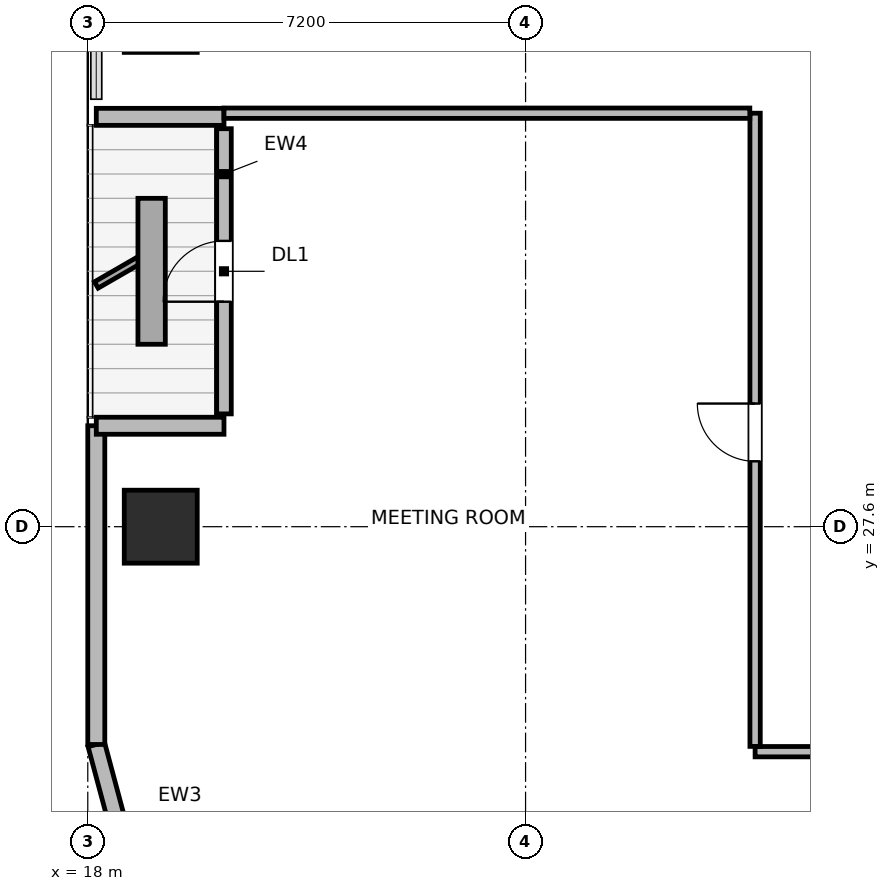
"""IFC4 building model, lengths in metres.
Left out: names, types, materials, properties, quantities, classifications, styles, units other than length and angle.
Written with IfcOpenShell. Run it as: python <this file> out.ifc"""

import sys

from ifc_helpers import new_model, si_unit, direction, frame, frame_2d, origin, origin_2d, place, context, subcontext, project, spatial, rectangle, extrude, element, fill, save


model = new_model("IFC4")
c1 = context("Model", 3, precision=1e-05, world=origin(), true_north=direction((0.0, 1.0)))
c2 = subcontext(c1, "Body", "Model", "MODEL_VIEW")
j1 = project(units=[si_unit("LENGTHUNIT", "METRE"), si_unit("PLANEANGLEUNIT", "RADIAN")], contexts=[c1])
p1 = place(None, origin())
s1 = spatial("IfcSite", under=j1, at=p1, CompositionType="ELEMENT")
p2 = place(p1, origin())
s2 = spatial("IfcBuilding", under=s1, at=p2, CompositionType="ELEMENT")
p3 = place(p2, frame((0.0, 0.0, 205.8)))
s3 = spatial("IfcBuildingStorey", under=s2, at=p3, CompositionType="ELEMENT", Elevation=205.8)
p4 = place(p3, frame((19.2, 27.6, 0.0), z_axis=(0.0, 0.0, 1.0), x_axis=(1.0, 0.0, 0.0)))
e1 = element("IfcColumn", 1, at=p4, inside=s3, PredefinedType="COLUMN", context=c2, shape_type="SweptSolid", body=[
    extrude(rectangle(XDim=1.2, YDim=1.2, at=origin_2d()), origin(), (0.0, 0.0, 1.0), 3.9),
])
p5 = place(p3, frame((18.848, 21.373, 0.0), z_axis=(0.0, 0.0, 1.0), x_axis=(-0.258672222976, 0.9659651552, 0.0)))
e2 = element("IfcWall", 2, at=p5, inside=s3, PredefinedType="SOLIDWALL", context=c2, shape_type="SweptSolid", body=[
    extrude(rectangle(XDim=2.739, YDim=0.28, at=frame_2d((1.37, 0.0))), origin(), (0.0, 0.0, 1.0), 3.6),
])
p6 = place(p3, frame((18.14, 24.018, 0.0), z_axis=(0.0, 0.0, 1.0), x_axis=(0.0, 1.0, 0.0)))
e3 = element("IfcWall", 3, at=p6, inside=s3, PredefinedType="SOLIDWALL", context=c2, shape_type="SweptSolid", body=[
    extrude(rectangle(XDim=5.242, YDim=0.28, at=frame_2d((2.621, 0.0))), origin(), (0.0, 0.0, 1.0), 3.6),
])
p7 = place(p3, frame((18.14, 29.26, 0.0), z_axis=(0.0, 0.0, 1.0), x_axis=(1.0, 0.0, 0.0)))
e4 = element("IfcWall", 4, at=p7, inside=s3, PredefinedType="SOLIDWALL", context=c2, shape_type="SweptSolid", body=[
    extrude(rectangle(XDim=2.1, YDim=0.28, at=frame_2d((1.05, 0.0))), origin(), (0.0, 0.0, 1.0), 2.195),
])
p8 = place(p3, frame((20.24, 29.455, 0.0), z_axis=(0.0, 0.0, 1.0), x_axis=(0.0, 1.0, 0.0)))
e5 = element("IfcWall", 5, at=p8, inside=s3, PredefinedType="SOLIDWALL", context=c2, shape_type="SweptSolid", body=[
    extrude(rectangle(XDim=4.69, YDim=0.24, at=frame_2d((2.345, 0.0))), origin(), (0.0, 0.0, 1.0), 3.168),
])
p9 = place(p8, frame((1.845, 0.0, 0.0)))
e6 = element("IfcOpeningElement", 6, at=p9, cuts=e5, PredefinedType="OPENING", context=c2, shape_type="SweptSolid", body=[
    extrude(rectangle(XDim=1.0, YDim=2.02, at=frame_2d((0.5, 1.01))), frame((0.0, 0.13, 0.0), z_axis=(0.0, -1.0, 0.0), x_axis=(1.0, 0.0, 0.0)), (0.0, 0.0, 1.0), 0.26),
])
p10 = place(p3, frame((20.24, 34.34, 0.0), z_axis=(0.0, 0.0, 1.0), x_axis=(-1.0, 0.0, 0.0)))
e7 = element("IfcWall", 7, at=p10, inside=s3, PredefinedType="SOLIDWALL", context=c2, shape_type="SweptSolid", body=[
    extrude(rectangle(XDim=2.1, YDim=0.28, at=frame_2d((1.05, 0.0))), origin(), (0.0, 0.0, 1.0), 2.195),
])
p11 = place(p3, frame((28.975, 23.9, 0.0), z_axis=(0.0, 0.0, 1.0), x_axis=(1.0, 0.0, 0.0)))
e8 = element("IfcWall", 8, at=p11, inside=s3, PredefinedType="PARTITIONING", context=c2, shape_type="SweptSolid", body=[
    extrude(rectangle(XDim=34.625, YDim=0.17, at=frame_2d((17.312, 0.0))), origin(), (0.0, 0.0, 1.0), 3.6),
])
p12 = place(p11, frame((2.427, 0.0, 0.0)))
e9 = element("IfcOpeningElement", 9, at=p12, cuts=e8, PredefinedType="OPENING", context=c2, shape_type="SweptSolid", body=[
    extrude(rectangle(XDim=0.95, YDim=2.04, at=frame_2d((0.475, 1.02))), frame((0.0, 0.095, 0.0), z_axis=(0.0, -1.0, 0.0), x_axis=(1.0, 0.0, 0.0)), (0.0, 0.0, 1.0), 0.19),
])
p13 = place(p11, frame((7.63, 0.0, 0.0)))
e10 = element("IfcOpeningElement", 10, at=p13, cuts=e8, PredefinedType="OPENING", context=c2, shape_type="SweptSolid", body=[
    extrude(rectangle(XDim=0.95, YDim=2.04, at=frame_2d((0.475, 1.02))), frame((0.0, 0.095, 0.0), z_axis=(0.0, -1.0, 0.0), x_axis=(1.0, 0.0, 0.0)), (0.0, 0.0, 1.0), 0.19),
])
p14 = place(p11, frame((14.535, 0.0, 0.0)))
e11 = element("IfcOpeningElement", 11, at=p14, cuts=e8, PredefinedType="OPENING", context=c2, shape_type="SweptSolid", body=[
    extrude(rectangle(XDim=0.95, YDim=2.04, at=frame_2d((0.475, 1.02))), frame((0.0, 0.095, 0.0), z_axis=(0.0, -1.0, 0.0), x_axis=(1.0, 0.0, 0.0)), (0.0, 0.0, 1.0), 0.19),
])
p15 = place(p11, frame((21.44, 0.0, 0.0)))
e12 = element("IfcOpeningElement", 12, at=p15, cuts=e8, PredefinedType="OPENING", context=c2, shape_type="SweptSolid", body=[
    extrude(rectangle(XDim=0.95, YDim=2.04, at=frame_2d((0.475, 1.02))), frame((0.0, 0.095, 0.0), z_axis=(0.0, -1.0, 0.0), x_axis=(1.0, 0.0, 0.0)), (0.0, 0.0, 1.0), 0.19),
])
p16 = place(p11, frame((26.045, 0.0, 0.0)))
e13 = element("IfcOpeningElement", 13, at=p16, cuts=e8, PredefinedType="OPENING", context=c2, shape_type="SweptSolid", body=[
    extrude(rectangle(XDim=0.95, YDim=2.04, at=frame_2d((0.475, 1.02))), frame((0.0, 0.095, 0.0), z_axis=(0.0, -1.0, 0.0), x_axis=(1.0, 0.0, 0.0)), (0.0, 0.0, 1.0), 0.19),
])
p17 = place(p11, frame((31.25, 0.0, 0.0)))
e14 = element("IfcOpeningElement", 14, at=p17, cuts=e8, PredefinedType="OPENING", context=c2, shape_type="SweptSolid", body=[
    extrude(rectangle(XDim=0.95, YDim=2.04, at=frame_2d((0.475, 1.02))), frame((0.0, 0.095, 0.0), z_axis=(0.0, -1.0, 0.0), x_axis=(1.0, 0.0, 0.0)), (0.0, 0.0, 1.0), 0.19),
])
p18 = place(p3, frame((28.975, 23.987, 0.0), z_axis=(0.0, 0.0, 1.0), x_axis=(0.0, 1.0, 0.0)))
e15 = element("IfcWall", 15, at=p18, inside=s3, PredefinedType="PARTITIONING", context=c2, shape_type="SweptSolid", body=[
    extrude(rectangle(XDim=10.413, YDim=0.17, at=frame_2d((5.207, 0.0))), origin(), (0.0, 0.0, 1.0), 3.6),
])
p19 = place(p18, frame((4.688, 0.0, 0.0)))
e16 = element("IfcOpeningElement", 16, at=p19, cuts=e15, PredefinedType="OPENING", context=c2, shape_type="SweptSolid", body=[
    extrude(rectangle(XDim=0.95, YDim=2.04, at=frame_2d((0.475, 1.02))), frame((0.0, 0.095, 0.0), z_axis=(0.0, -1.0, 0.0), x_axis=(1.0, 0.0, 0.0)), (0.0, 0.0, 1.0), 0.19),
])
p20 = place(p3, frame((20.24, 34.4, 0.0), z_axis=(0.0, 0.0, 1.0), x_axis=(1.0, 0.0, 0.0)))
e17 = element("IfcWall", 17, at=p20, inside=s3, PredefinedType="PARTITIONING", context=c2, shape_type="SweptSolid", body=[
    extrude(rectangle(XDim=8.648, YDim=0.17, at=frame_2d((4.324, 0.0))), origin(), (0.0, 0.0, 1.0), 3.6),
])
p21 = place(p9, origin())
e18 = element("IfcDoor", 18, at=p21, inside=s3, OperationType="SINGLE_SWING_LEFT", PredefinedType="DOOR", context=c2, shape_type="SweptSolid", body=[
    extrude(rectangle(XDim=1.0, YDim=2.02, at=frame_2d((0.5, 1.01))), frame((0.0, 0.025, 0.0), z_axis=(0.0, -1.0, 0.0), x_axis=(1.0, 0.0, 0.0)), (0.0, 0.0, 1.0), 0.05),
])
fill(e6, e18)
p22 = place(p19, origin())
e19 = element("IfcDoor", 19, at=p22, inside=s3, OperationType="SINGLE_SWING_RIGHT", PredefinedType="DOOR", context=c2, shape_type="SweptSolid", body=[
    extrude(rectangle(XDim=0.95, YDim=2.04, at=frame_2d((0.475, 1.02))), frame((0.0, 0.025, 0.0), z_axis=(0.0, -1.0, 0.0), x_axis=(1.0, 0.0, 0.0)), (0.0, 0.0, 1.0), 0.05),
])
fill(e16, e19)
save(model, sys.argv[1])
